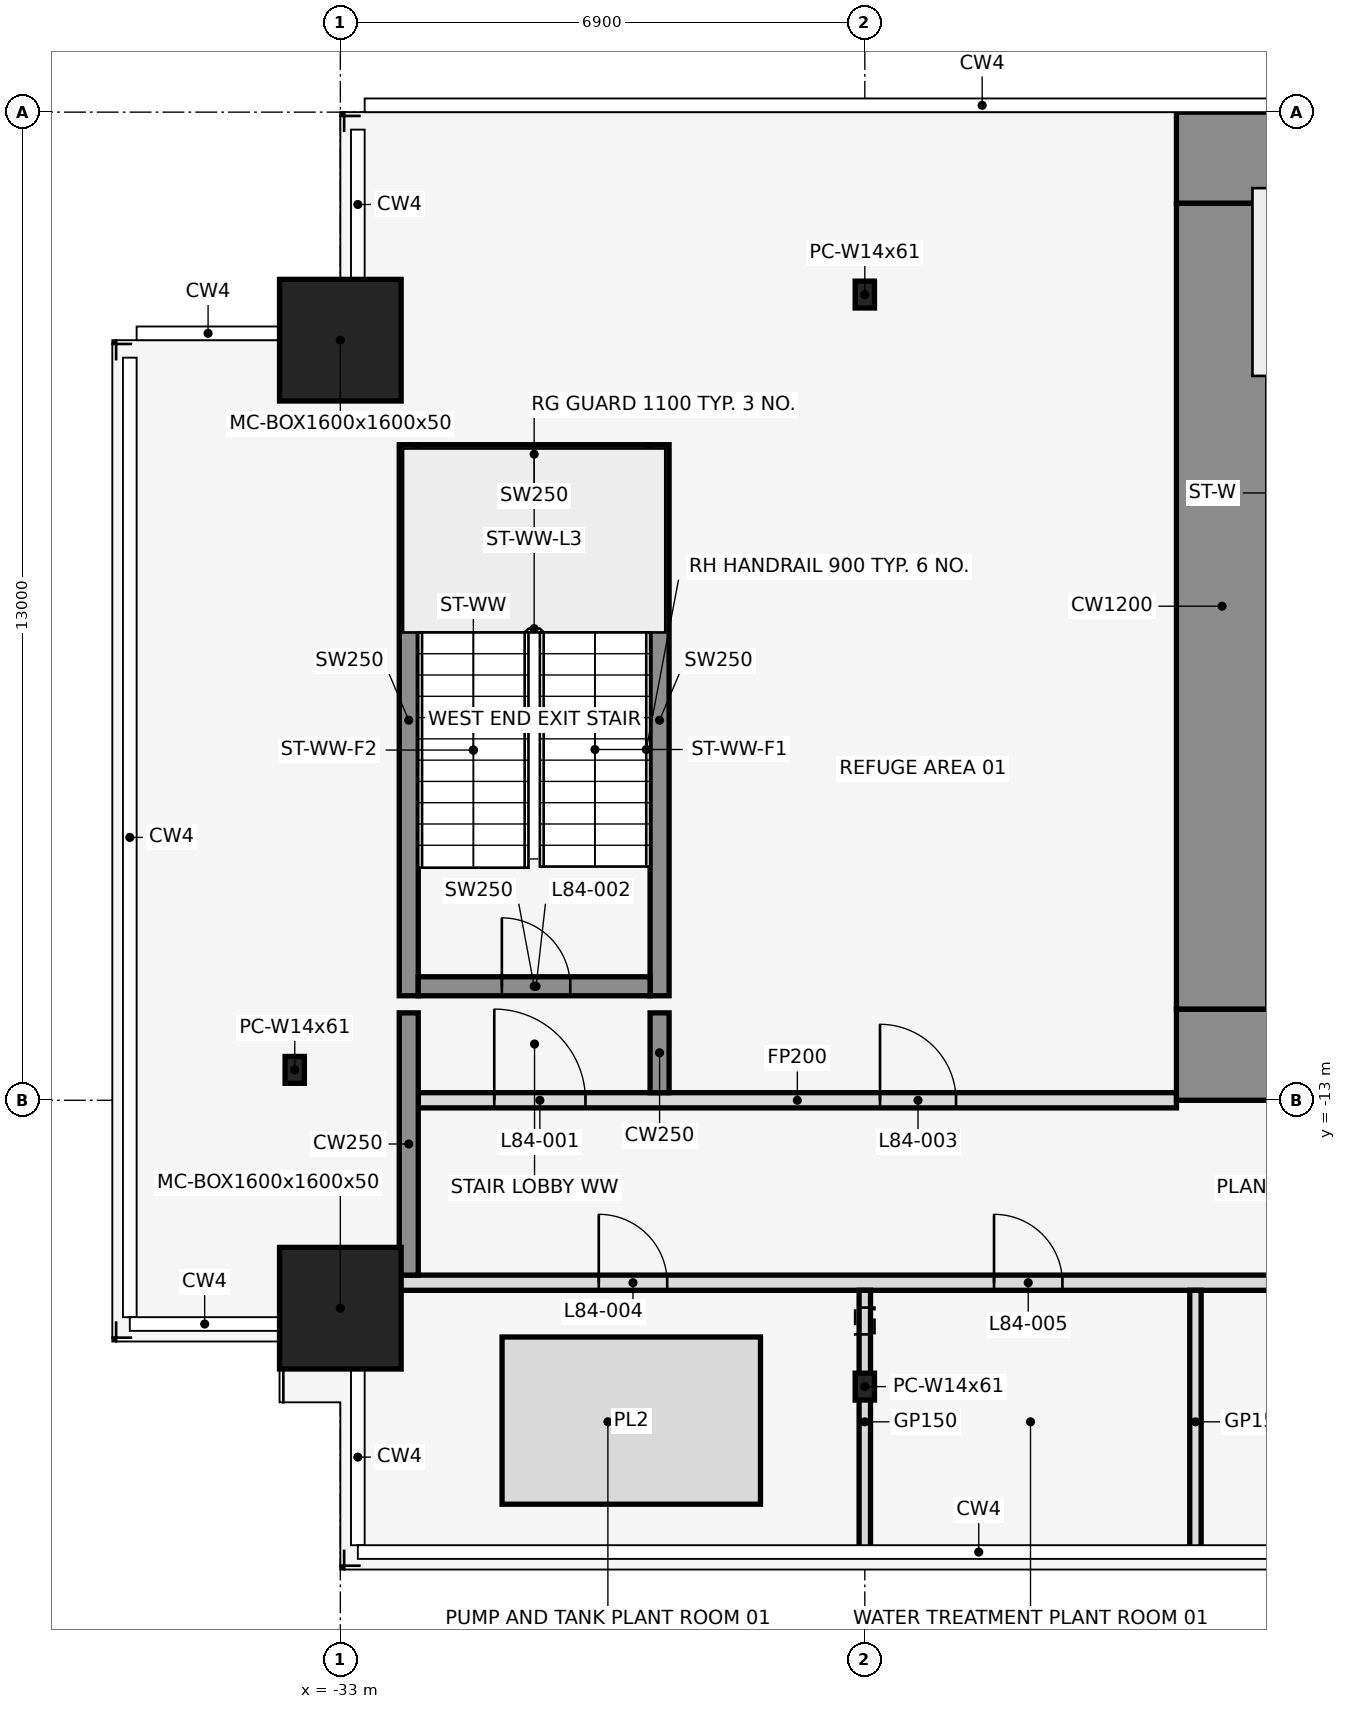
"""IFC4 building model, lengths in metres.
Left out: names, types, materials, properties, quantities, classifications, styles, units other than length and angle.
Written with IfcOpenShell. Run it as: python <this file> out.ifc"""

import sys

from ifc_helpers import new_model, si_unit, direction, frame, frame_2d, origin, origin_2d, place, context, subcontext, project, spatial, rectangle, hollow_rectangle, i_section, extrude, element, fill, save


model = new_model("IFC4")
c1 = context("Model", 3, precision=1e-05, world=origin(), true_north=direction((0.0, 1.0)))
c2 = subcontext(c1, "Body", "Model", "MODEL_VIEW")
j1 = project(units=[si_unit("LENGTHUNIT", "METRE"), si_unit("PLANEANGLEUNIT", "RADIAN")], contexts=[c1])
p1 = place(None, origin())
s1 = spatial("IfcSite", under=j1, at=p1, CompositionType="ELEMENT")
p2 = place(p1, origin())
s2 = spatial("IfcBuilding", under=s1, at=p2, CompositionType="ELEMENT")
p3 = place(p2, frame((0.0, 0.0, 374.9)))
s3 = spatial("IfcBuildingStorey", under=s2, at=p3, CompositionType="ELEMENT", Elevation=374.9)
for number, where, z_axis, x_axis in (
    (1, (-33.0, -15.735, 0.0), (0.0, 0.0, 1.0), (1.0, 0.0, 0.0)),
    (2, (-33.0, -3.0, 0.0), (0.0, 0.0, 1.0), (1.0, 0.0, 0.0)),
):
    element("IfcColumn", number, at=place(p3, frame(where, z_axis=z_axis, x_axis=x_axis)), inside=s3, PredefinedType="COLUMN", context=c2, shape_type="SweptSolid", body=[
        extrude(hollow_rectangle(XDim=1.6, YDim=1.6, WallThickness=0.05, at=origin_2d()), origin(), (0.0, 0.0, 1.0), 4.5),
    ])
p4 = place(p3, frame((-26.1, -16.767, 0.034), z_axis=(0.0, 0.191154699822, 0.981559922132), x_axis=(-1.0, 0.0, 0.0)))
e3 = element("IfcColumn", 3, at=p4, inside=s3, PredefinedType="COLUMN", context=c2, shape_type="SweptSolid", body=[
    extrude(i_section(OverallWidth=0.254, OverallDepth=0.353, WebThickness=0.01, FlangeThickness=0.016, at=origin_2d()), origin(), (0.0, 0.0, 1.0), 4.516),
])
for number, where, z_axis, x_axis in (
    (4, (-26.1, -2.4, 0.0), (0.0, 0.0, 1.0), (1.0, 0.0, 0.0)),
    (5, (-33.6, -12.6, 0.0), (0.0, 0.0, 1.0), (1.0, 0.0, 0.0)),
):
    element("IfcColumn", number, at=place(p3, frame(where, z_axis=z_axis, x_axis=x_axis)), inside=s3, PredefinedType="COLUMN", context=c2, shape_type="SweptSolid", body=[
        extrude(i_section(OverallWidth=0.254, OverallDepth=0.353, WebThickness=0.01, FlangeThickness=0.016, at=origin_2d()), origin(), (0.0, 0.0, 1.0), 4.5),
    ])
p5 = place(p3, frame((-29.173, -17.214, 0.0), z_axis=(0.0, 0.0, 1.0), x_axis=(1.0, 0.0, 0.0)))
e6 = element("IfcWall", 6, at=p5, inside=s3, PredefinedType="USERDEFINED", context=c2, shape_type="SweptSolid", body=[
    extrude(rectangle(XDim=3.4, YDim=2.2, at=origin_2d()), origin(), (0.0, 0.0, 1.0), 0.2),
])
for number, where, z_axis, x_axis in (
    (7, (-32.1, -11.625, 0.0), (0.0, 0.0, 1.0), (0.0, 1.0, 0.0)),
    (8, (-28.8, -11.625, 0.0), (0.0, 0.0, 1.0), (0.0, 1.0, 0.0)),
):
    element("IfcWall", number, at=place(p3, frame(where, z_axis=z_axis, x_axis=x_axis)), inside=s3, PredefinedType="SHEAR", context=c2, shape_type="SweptSolid", body=[
        extrude(rectangle(XDim=7.25, YDim=0.25, at=frame_2d((3.625, 0.0))), origin(), (0.0, 0.0, 1.0), 4.5),
    ])
p6 = place(p3, frame((-31.975, -11.5, 0.0), z_axis=(0.0, 0.0, 1.0), x_axis=(1.0, 0.0, 0.0)))
e9 = element("IfcWall", 9, at=p6, inside=s3, PredefinedType="SHEAR", context=c2, shape_type="SweptSolid", body=[
    extrude(rectangle(XDim=3.05, YDim=0.25, at=frame_2d((1.525, 0.0))), origin(), (0.0, 0.0, 1.0), 4.5),
])
p7 = place(p6, frame((1.1, 0.0, 0.0)))
e10 = element("IfcOpeningElement", 10, at=p7, cuts=e9, PredefinedType="OPENING", context=c2, shape_type="SweptSolid", body=[
    extrude(rectangle(XDim=0.9, YDim=2.1, at=frame_2d((0.45, 1.05))), frame((0.0, 0.137, 0.0), z_axis=(0.0, -1.0, 0.0), x_axis=(1.0, 0.0, 0.0)), (0.0, 0.0, 1.0), 0.274),
])
p8 = place(p3, frame((-31.975, -4.5, 0.0), z_axis=(0.0, 0.0, 1.0), x_axis=(1.0, 0.0, 0.0)))
e11 = element("IfcWall", 11, at=p8, inside=s3, PredefinedType="SHEAR", context=c2, shape_type="SweptSolid", body=[
    extrude(rectangle(XDim=3.05, YDim=0.25, at=frame_2d((1.525, 0.0))), origin(), (0.0, 0.0, 1.0), 4.5),
])
p9 = place(p3, frame((-32.225, -15.4, 0.0), z_axis=(0.0, 0.0, 1.0), x_axis=(1.0, 0.0, 0.0)))
e12 = element("IfcWall", 12, at=p9, inside=s3, PredefinedType="PARTITIONING", context=c2, shape_type="SweptSolid", body=[
    extrude(rectangle(XDim=23.925, YDim=0.2, at=frame_2d((11.962, 0.0))), origin(), (0.0, 0.0, 1.0), 3.368),
])
p10 = place(p9, frame((2.625, 0.0, 0.0)))
e13 = element("IfcOpeningElement", 13, at=p10, cuts=e12, PredefinedType="OPENING", context=c2, shape_type="SweptSolid", body=[
    extrude(rectangle(XDim=0.9, YDim=2.1, at=frame_2d((0.45, 1.05))), frame((0.0, 0.112, 0.0), z_axis=(0.0, -1.0, 0.0), x_axis=(1.0, 0.0, 0.0)), (0.0, 0.0, 1.0), 0.224),
])
p11 = place(p9, frame((7.825, 0.0, 0.0)))
e14 = element("IfcOpeningElement", 14, at=p11, cuts=e12, PredefinedType="OPENING", context=c2, shape_type="SweptSolid", body=[
    extrude(rectangle(XDim=0.9, YDim=2.1, at=frame_2d((0.45, 1.05))), frame((0.0, 0.112, 0.0), z_axis=(0.0, -1.0, 0.0), x_axis=(1.0, 0.0, 0.0)), (0.0, 0.0, 1.0), 0.224),
])
p12 = place(p9, frame((17.475, 0.0, 0.0)))
e15 = element("IfcOpeningElement", 15, at=p12, cuts=e12, PredefinedType="OPENING", context=c2, shape_type="SweptSolid", body=[
    extrude(rectangle(XDim=1.0, YDim=2.1, at=frame_2d((0.5, 1.05))), frame((0.0, 0.112, 0.0), z_axis=(0.0, -1.0, 0.0), x_axis=(1.0, 0.0, 0.0)), (0.0, 0.0, 1.0), 0.224),
])
p13 = place(p3, frame((-31.975, -13.0, 0.0), z_axis=(0.0, 0.0, 1.0), x_axis=(1.0, 0.0, 0.0)))
e16 = element("IfcWall", 16, at=p13, inside=s3, PredefinedType="PARTITIONING", context=c2, shape_type="SweptSolid", body=[
    extrude(rectangle(XDim=9.975, YDim=0.2, at=frame_2d((4.988, 0.0))), origin(), (0.0, 0.0, 1.0), 3.368),
])
p14 = place(p13, frame((1.0, 0.0, 0.0)))
e17 = element("IfcOpeningElement", 17, at=p14, cuts=e16, PredefinedType="OPENING", context=c2, shape_type="SweptSolid", body=[
    extrude(rectangle(XDim=1.2, YDim=2.1, at=frame_2d((0.6, 1.05))), frame((0.0, 0.112, 0.0), z_axis=(0.0, -1.0, 0.0), x_axis=(1.0, 0.0, 0.0)), (0.0, 0.0, 1.0), 0.224),
])
p15 = place(p13, frame((6.075, 0.0, 0.0)))
e18 = element("IfcOpeningElement", 18, at=p15, cuts=e16, PredefinedType="OPENING", context=c2, shape_type="SweptSolid", body=[
    extrude(rectangle(XDim=1.0, YDim=2.1, at=frame_2d((0.5, 1.05))), frame((0.0, 0.112, 0.0), z_axis=(0.0, -1.0, 0.0), x_axis=(1.0, 0.0, 0.0)), (0.0, 0.0, 1.0), 0.224),
])
p16 = place(p3, frame((-32.1, -15.3, 0.0), z_axis=(0.0, 0.0, 1.0), x_axis=(0.0, 1.0, 0.0)))
e19 = element("IfcWall", 19, at=p16, inside=s3, PredefinedType="SHEAR", context=c2, shape_type="SweptSolid", body=[
    extrude(rectangle(XDim=3.45, YDim=0.25, at=frame_2d((1.725, 0.0))), origin(), (0.0, 0.0, 1.0), 4.5),
])
p17 = place(p3, frame((-28.8, -12.9, 0.0), z_axis=(0.0, 0.0, 1.0), x_axis=(0.0, 1.0, 0.0)))
e20 = element("IfcWall", 20, at=p17, inside=s3, PredefinedType="SHEAR", context=c2, shape_type="SweptSolid", body=[
    extrude(rectangle(XDim=1.05, YDim=0.25, at=frame_2d((0.525, 0.0))), origin(), (0.0, 0.0, 1.0), 4.5),
])
for number, where, z_axis, x_axis in (
    (21, (-26.1, -18.96, 0.0), (0.0, 0.0, 1.0), (0.0, 1.0, 0.0)),
    (22, (-21.75, -18.96, 0.0), (0.0, 0.0, 1.0), (0.0, 1.0, 0.0)),
):
    element("IfcWall", number, at=place(p3, frame(where, z_axis=z_axis, x_axis=x_axis)), inside=s3, PredefinedType="PARTITIONING", context=c2, shape_type="SweptSolid", body=[
        extrude(rectangle(XDim=3.46, YDim=0.15, at=frame_2d((1.73, 0.0))), origin(), (0.0, 0.0, 1.0), 3.368),
    ])
p18 = place(p3, frame((-22.0, -0.6, 0.0), z_axis=(0.0, 0.0, 1.0), x_axis=(1.0, 0.0, 0.0)))
e23 = element("IfcWall", 23, at=p18, inside=s3, PredefinedType="SHEAR", context=c2, shape_type="SweptSolid", body=[
    extrude(rectangle(XDim=13.7, YDim=1.2, at=frame_2d((6.85, 0.0))), origin(), (0.0, 0.0, 1.0), 4.5),
])
p19 = place(p3, frame((-22.0, -12.4, 0.0), z_axis=(0.0, 0.0, 1.0), x_axis=(1.0, 0.0, 0.0)))
e24 = element("IfcWall", 24, at=p19, inside=s3, PredefinedType="SHEAR", context=c2, shape_type="SweptSolid", body=[
    extrude(rectangle(XDim=13.7, YDim=1.2, at=frame_2d((6.85, 0.0))), origin(), (0.0, 0.0, 1.0), 4.5),
])
p20 = place(p19, frame((2.2, 0.0, 0.0)))
e25 = element("IfcOpeningElement", 25, at=p20, cuts=e24, PredefinedType="OPENING", context=c2, shape_type="SweptSolid", body=[
    extrude(rectangle(XDim=1.2, YDim=2.1, at=frame_2d((0.6, 1.05))), frame((0.0, 0.612, 0.0), z_axis=(0.0, -1.0, 0.0), x_axis=(1.0, 0.0, 0.0)), (0.0, 0.0, 1.0), 1.224),
])
p21 = place(p19, frame((10.75, 0.0, 0.0)))
e26 = element("IfcOpeningElement", 26, at=p21, cuts=e24, PredefinedType="OPENING", context=c2, shape_type="SweptSolid", body=[
    extrude(rectangle(XDim=1.2, YDim=2.1, at=frame_2d((0.6, 1.05))), frame((0.0, 0.612, 0.0), z_axis=(0.0, -1.0, 0.0), x_axis=(1.0, 0.0, 0.0)), (0.0, 0.0, 1.0), 1.224),
])
p22 = place(p19, frame((6.3, 0.0, 0.0)))
e27 = element("IfcOpeningElement", 27, at=p22, cuts=e24, PredefinedType="OPENING", context=c2, shape_type="SweptSolid", body=[
    extrude(rectangle(XDim=1.2, YDim=2.1, at=frame_2d((0.6, 1.05))), frame((0.0, 0.612, 0.0), z_axis=(0.0, -1.0, 0.0), x_axis=(1.0, 0.0, 0.0)), (0.0, 0.0, 1.0), 1.224),
])
p23 = place(p3, frame((-21.4, -11.8, 0.0), z_axis=(0.0, 0.0, 1.0), x_axis=(0.0, 1.0, 0.0)))
e28 = element("IfcWall", 28, at=p23, inside=s3, PredefinedType="SHEAR", context=c2, shape_type="SweptSolid", body=[
    extrude(rectangle(XDim=10.6, YDim=1.2, at=frame_2d((5.3, 0.0))), origin(), (0.0, 0.0, 1.0), 4.5),
])
p24 = place(p14, origin())
e29 = element("IfcDoor", 29, at=p24, inside=s3, OperationType="SINGLE_SWING_LEFT", PredefinedType="DOOR", context=c2, shape_type="SweptSolid", body=[
    extrude(rectangle(XDim=1.2, YDim=2.1, at=frame_2d((0.6, 1.05))), frame((0.0, 0.025, 0.0), z_axis=(0.0, -1.0, 0.0), x_axis=(1.0, 0.0, 0.0)), (0.0, 0.0, 1.0), 0.05),
])
fill(e17, e29)
p25 = place(p7, origin())
e30 = element("IfcDoor", 30, at=p25, inside=s3, OperationType="SINGLE_SWING_LEFT", PredefinedType="DOOR", context=c2, shape_type="SweptSolid", body=[
    extrude(rectangle(XDim=0.9, YDim=2.1, at=frame_2d((0.45, 1.05))), frame((0.0, 0.025, 0.0), z_axis=(0.0, -1.0, 0.0), x_axis=(1.0, 0.0, 0.0)), (0.0, 0.0, 1.0), 0.05),
])
fill(e10, e30)
p26 = place(p15, origin())
e31 = element("IfcDoor", 31, at=p26, inside=s3, OperationType="SINGLE_SWING_RIGHT", PredefinedType="DOOR", context=c2, shape_type="SweptSolid", body=[
    extrude(rectangle(XDim=1.0, YDim=2.1, at=frame_2d((0.5, 1.05))), frame((0.0, 0.025, 0.0), z_axis=(0.0, -1.0, 0.0), x_axis=(1.0, 0.0, 0.0)), (0.0, 0.0, 1.0), 0.05),
])
fill(e18, e31)
p27 = place(p10, frame((0.9, 0.0, 0.0), z_axis=(0.0, 0.0, 1.0), x_axis=(-1.0, 0.0, 0.0)))
e32 = element("IfcDoor", 32, at=p27, inside=s3, OperationType="SINGLE_SWING_LEFT", PredefinedType="DOOR", context=c2, shape_type="SweptSolid", body=[
    extrude(rectangle(XDim=0.9, YDim=2.1, at=frame_2d((0.45, 1.05))), frame((0.0, 0.025, 0.0), z_axis=(0.0, -1.0, 0.0), x_axis=(1.0, 0.0, 0.0)), (0.0, 0.0, 1.0), 0.05),
])
fill(e13, e32)
p28 = place(p11, frame((0.9, 0.0, 0.0), z_axis=(0.0, 0.0, 1.0), x_axis=(-1.0, 0.0, 0.0)))
e33 = element("IfcDoor", 33, at=p28, inside=s3, OperationType="SINGLE_SWING_RIGHT", PredefinedType="DOOR", context=c2, shape_type="SweptSolid", body=[
    extrude(rectangle(XDim=0.9, YDim=2.1, at=frame_2d((0.45, 1.05))), frame((0.0, 0.025, 0.0), z_axis=(0.0, -1.0, 0.0), x_axis=(1.0, 0.0, 0.0)), (0.0, 0.0, 1.0), 0.05),
])
fill(e14, e33)
save(model, sys.argv[1])
